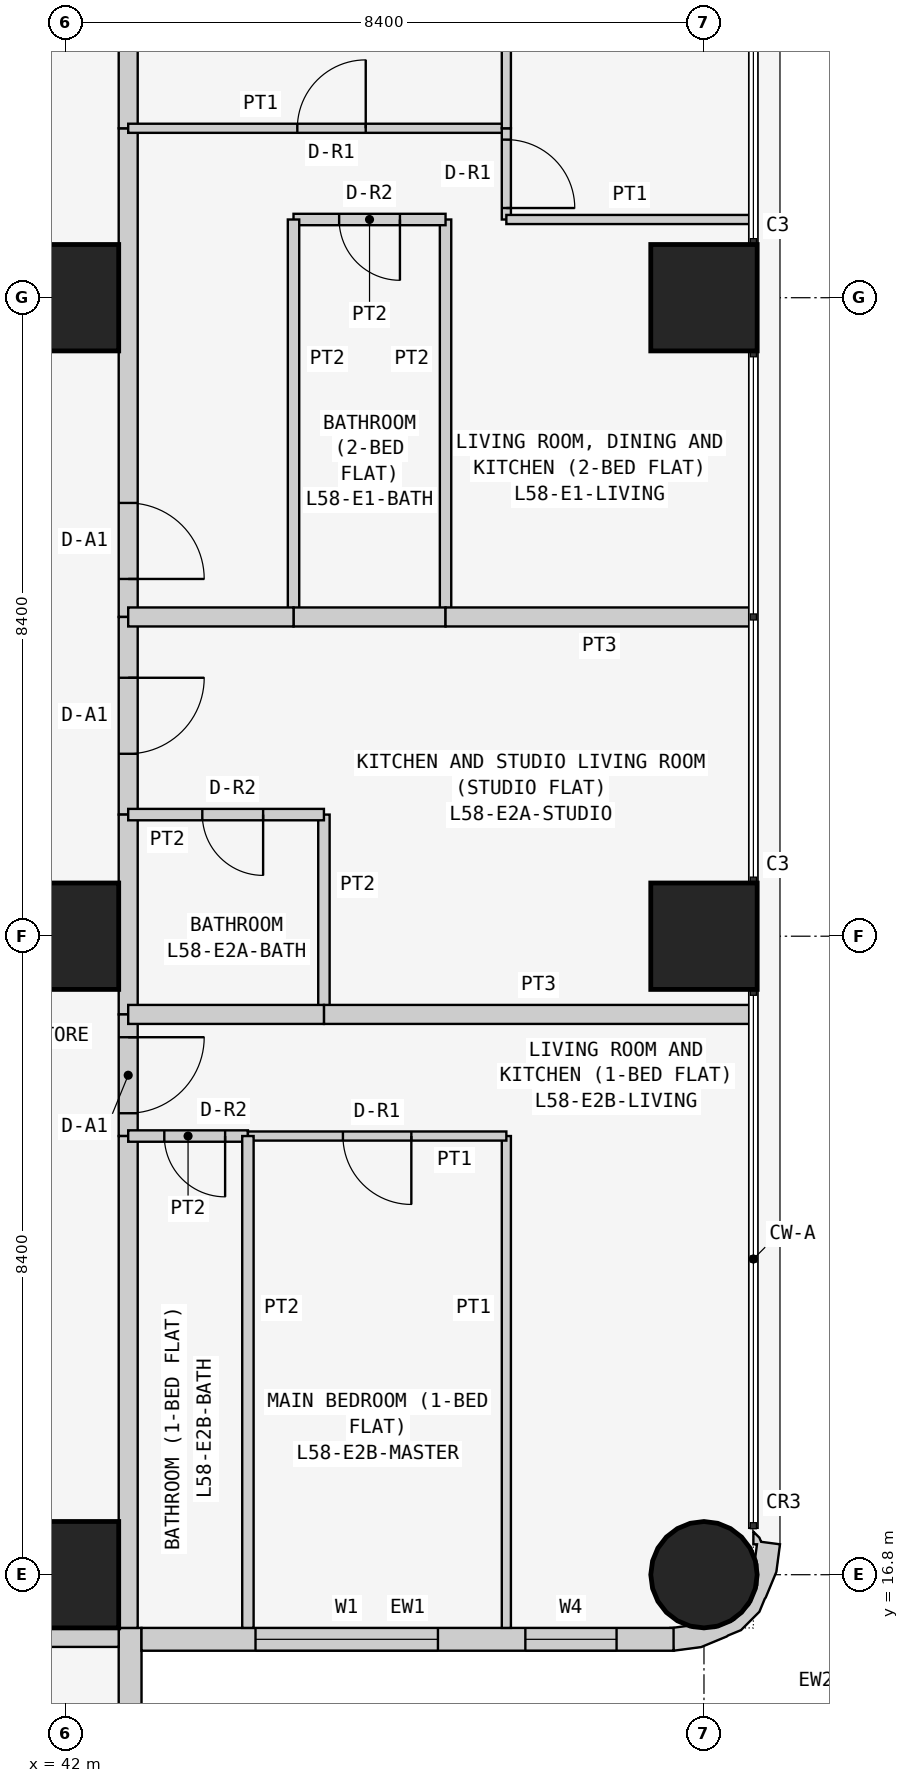
"""IFC4 building model, lengths in metres.
Left out: names, types, materials, properties, quantities, classifications, styles, units other than length and angle.
Written with IfcOpenShell. Run it as: python <this file> out.ifc"""

import sys

from ifc_helpers import new_model, si_unit, direction, frame, frame_2d, origin, origin_2d, place, context, subcontext, project, spatial, polyline, rectangle, circle, outline, extrude, element, fill, save


model = new_model("IFC4")
c1 = context("Model", 3, precision=1e-05, world=origin(), true_north=direction((0.0, 1.0)))
c2 = subcontext(c1, "Body", "Model", "MODEL_VIEW")
j1 = project(units=[si_unit("LENGTHUNIT", "METRE"), si_unit("PLANEANGLEUNIT", "RADIAN")], contexts=[c1])
p1 = place(None, origin())
s1 = spatial("IfcSite", under=j1, at=p1, CompositionType="ELEMENT")
p2 = place(p1, origin())
s2 = spatial("IfcBuilding", under=s1, at=p2, CompositionType="ELEMENT")
p3 = place(p2, frame((0.0, 0.0, 222.9)))
s3 = spatial("IfcBuildingStorey", under=s2, at=p3, CompositionType="ELEMENT", Elevation=222.9)
for number, where, z_axis, x_axis in (
    (1, (42.0, 16.8, 0.0), (0.0, 0.0, 1.0), (1.0, 0.0, 0.0)),
    (2, (42.0, 25.2, 0.0), (0.0, 0.0, 1.0), (1.0, 0.0, 0.0)),
    (3, (42.0, 33.6, 0.0), (0.0, 0.0, 1.0), (1.0, 0.0, 0.0)),
):
    element("IfcColumn", number, at=place(p3, frame(where, z_axis=z_axis, x_axis=x_axis)), inside=s3, PredefinedType="COLUMN", context=c2, shape_type="SweptSolid", body=[
        extrude(rectangle(XDim=1.4, YDim=1.4, at=origin_2d()), origin(), (0.0, 0.0, 1.0), 3.6),
    ])
p4 = place(p3, frame((50.4, 16.8, 0.0), z_axis=(0.0, 0.0, 1.0), x_axis=(1.0, 0.0, 0.0)))
e4 = element("IfcColumn", 4, at=p4, inside=s3, PredefinedType="COLUMN", context=c2, shape_type="SweptSolid", body=[
    extrude(circle(Radius=0.7, at=origin_2d()), origin(), (0.0, 0.0, 1.0), 3.6),
])
for number, where, z_axis, x_axis in (
    (5, (50.4, 25.2, 0.0), (0.0, 0.0, 1.0), (1.0, 0.0, 0.0)),
    (6, (50.4, 33.6, 0.0), (0.0, 0.0, 1.0), (1.0, 0.0, 0.0)),
):
    element("IfcColumn", number, at=place(p3, frame(where, z_axis=z_axis, x_axis=x_axis)), inside=s3, PredefinedType="COLUMN", context=c2, shape_type="SweptSolid", body=[
        extrude(rectangle(XDim=1.4, YDim=1.4, at=origin_2d()), origin(), (0.0, 0.0, 1.0), 3.6),
    ])
p5 = place(p3, frame((42.85, 8.8, 0.0), z_axis=(0.0, 0.0, 1.0), x_axis=(0.0, 1.0, 0.0)))
e7 = element("IfcWall", 7, at=p5, inside=s3, PredefinedType="SOLIDWALL", context=c2, shape_type="SweptSolid", body=[
    extrude(rectangle(XDim=7.3, YDim=0.3, at=frame_2d((3.65, 0.0))), origin(), (0.0, 0.0, 1.0), 3.45),
])
p6 = place(p5, frame((3.1, 0.0, 0.9)))
e8 = element("IfcOpeningElement", 8, at=p6, cuts=e7, PredefinedType="OPENING", context=c2, shape_type="SweptSolid", body=[
    extrude(rectangle(XDim=2.4, YDim=1.5, at=frame_2d((1.2, 0.75))), frame((0.0, 0.16, 0.0), z_axis=(0.0, -1.0, 0.0), x_axis=(1.0, 0.0, 0.0)), (0.0, 0.0, 1.0), 0.32),
])
p7 = place(p5, frame((0.75, 0.0, 0.9)))
e9 = element("IfcOpeningElement", 9, at=p7, cuts=e7, PredefinedType="OPENING", context=c2, shape_type="SweptSolid", body=[
    extrude(rectangle(XDim=1.2, YDim=1.5, at=frame_2d((0.6, 0.75))), frame((0.0, 0.16, 0.0), z_axis=(0.0, -1.0, 0.0), x_axis=(1.0, 0.0, 0.0)), (0.0, 0.0, 1.0), 0.32),
])
p8 = place(p3, frame((43.0, 15.95, 0.0), z_axis=(0.0, 0.0, 1.0), x_axis=(1.0, 0.0, 0.0)))
e10 = element("IfcWall", 10, at=p8, inside=s3, PredefinedType="SOLIDWALL", context=c2, shape_type="SweptSolid", body=[
    extrude(rectangle(XDim=7.0, YDim=0.3, at=frame_2d((3.5, 0.0))), origin(), (0.0, 0.0, 1.0), 3.45),
])
p9 = place(p8, frame((1.5, 0.0, 0.9)))
e11 = element("IfcOpeningElement", 11, at=p9, cuts=e10, PredefinedType="OPENING", context=c2, shape_type="SweptSolid", body=[
    extrude(rectangle(XDim=2.4, YDim=1.5, at=frame_2d((1.2, 0.75))), frame((0.0, 0.16, 0.0), z_axis=(0.0, -1.0, 0.0), x_axis=(1.0, 0.0, 0.0)), (0.0, 0.0, 1.0), 0.32),
])
p10 = place(p8, frame((5.05, 0.0, 0.9)))
e12 = element("IfcOpeningElement", 12, at=p10, cuts=e10, PredefinedType="OPENING", context=c2, shape_type="SweptSolid", body=[
    extrude(rectangle(XDim=1.2, YDim=1.5, at=frame_2d((0.6, 0.75))), frame((0.0, 0.16, 0.0), z_axis=(0.0, -1.0, 0.0), x_axis=(1.0, 0.0, 0.0)), (0.0, 0.0, 1.0), 0.32),
])
p11 = place(p3, frame((50.11, 16.076, 0.0), z_axis=(0.0, 0.0, 1.0), x_axis=(0.898030234854, -0.439933741929, 0.0)))
e13 = element("IfcWall", 13, at=p11, inside=s3, PredefinedType="SOLIDWALL", context=c2, shape_type="SweptSolid", body=[
    extrude(outline(polyline([(0.664, 1.577), (0.426, 1.497), (0.382, 1.536), (0.276, 1.572), (0.349, 1.423), (0.392, 1.444), (0.453, 1.261), (0.51, 1.211), (0.632, 0.961), (0.65, 0.683), (0.56, 0.419), (0.375, 0.21), (0.125, 0.087), (0.05, 0.082), (-0.128, -0.035), (-0.145, -0.044), (0.022, -0.296), (0.327, -0.094), (0.568, 0.18), (0.577, 0.199), (0.7, 0.337), (0.811, 0.661), (0.799, 0.846), (0.803, 0.866), (0.78, 1.231), (0.664, 1.577)])), origin(), (0.0, 0.0, 1.0), 3.45),
])
p12 = place(p3, frame((42.825, 35.829, 0.0), z_axis=(0.0, 0.0, 1.0), x_axis=(0.0, -1.0, 0.0)))
e14 = element("IfcWall", 14, at=p12, inside=s3, PredefinedType="PARTITIONING", context=c2, shape_type="SweptSolid", body=[
    extrude(rectangle(XDim=6.429, YDim=0.25, at=frame_2d((3.215, 0.0))), origin(), (0.0, 0.0, 1.0), 3.45),
])
p13 = place(p12, frame((4.929, 0.0, 0.0)))
e15 = element("IfcOpeningElement", 15, at=p13, cuts=e14, PredefinedType="OPENING", context=c2, shape_type="SweptSolid", body=[
    extrude(rectangle(XDim=1.0, YDim=2.1, at=frame_2d((0.5, 1.05))), frame((0.0, 0.135, 0.0), z_axis=(0.0, -1.0, 0.0), x_axis=(1.0, 0.0, 0.0)), (0.0, 0.0, 1.0), 0.27),
])
p14 = place(p3, frame((42.825, 42.7, 0.0), z_axis=(0.0, 0.0, 1.0), x_axis=(0.0, -1.0, 0.0)))
e16 = element("IfcWall", 16, at=p14, inside=s3, PredefinedType="PARTITIONING", context=c2, shape_type="SweptSolid", body=[
    extrude(rectangle(XDim=6.871, YDim=0.25, at=frame_2d((3.436, 0.0))), origin(), (0.0, 0.0, 1.0), 3.45),
])
p15 = place(p3, frame((42.825, 29.4, 0.0), z_axis=(0.0, 0.0, 1.0), x_axis=(0.0, -1.0, 0.0)))
e17 = element("IfcWall", 17, at=p15, inside=s3, PredefinedType="PARTITIONING", context=c2, shape_type="SweptSolid", body=[
    extrude(rectangle(XDim=2.6, YDim=0.25, at=frame_2d((1.3, 0.0))), origin(), (0.0, 0.0, 1.0), 3.45),
])
p16 = place(p15, frame((0.8, 0.0, 0.0)))
e18 = element("IfcOpeningElement", 18, at=p16, cuts=e17, PredefinedType="OPENING", context=c2, shape_type="SweptSolid", body=[
    extrude(rectangle(XDim=1.0, YDim=2.1, at=frame_2d((0.5, 1.05))), frame((0.0, 0.135, 0.0), z_axis=(0.0, -1.0, 0.0), x_axis=(1.0, 0.0, 0.0)), (0.0, 0.0, 1.0), 0.27),
])
p17 = place(p3, frame((42.825, 26.8, 0.0), z_axis=(0.0, 0.0, 1.0), x_axis=(0.0, -1.0, 0.0)))
e19 = element("IfcWall", 19, at=p17, inside=s3, PredefinedType="PARTITIONING", context=c2, shape_type="SweptSolid", body=[
    extrude(rectangle(XDim=2.629, YDim=0.25, at=frame_2d((1.314, 0.0))), origin(), (0.0, 0.0, 1.0), 3.45),
])
p18 = place(p3, frame((42.825, 24.171, 0.0), z_axis=(0.0, 0.0, 1.0), x_axis=(0.0, -1.0, 0.0)))
e20 = element("IfcWall", 20, at=p18, inside=s3, PredefinedType="PARTITIONING", context=c2, shape_type="SweptSolid", body=[
    extrude(rectangle(XDim=1.6, YDim=0.25, at=frame_2d((0.8, 0.0))), origin(), (0.0, 0.0, 1.0), 3.45),
])
p19 = place(p18, frame((0.3, 0.0, 0.0)))
e21 = element("IfcOpeningElement", 21, at=p19, cuts=e20, PredefinedType="OPENING", context=c2, shape_type="SweptSolid", body=[
    extrude(rectangle(XDim=1.0, YDim=2.1, at=frame_2d((0.5, 1.05))), frame((0.0, 0.135, 0.0), z_axis=(0.0, -1.0, 0.0), x_axis=(1.0, 0.0, 0.0)), (0.0, 0.0, 1.0), 0.27),
])
p20 = place(p3, frame((42.825, 22.571, 0.0), z_axis=(0.0, 0.0, 1.0), x_axis=(0.0, -1.0, 0.0)))
e22 = element("IfcWall", 22, at=p20, inside=s3, PredefinedType="PARTITIONING", context=c2, shape_type="SweptSolid", body=[
    extrude(rectangle(XDim=6.471, YDim=0.25, at=frame_2d((3.235, 0.0))), origin(), (0.0, 0.0, 1.0), 3.45),
])
p21 = place(p3, frame((42.7, 15.975, 0.0), z_axis=(0.0, 0.0, 1.0), x_axis=(-1.0, 0.0, 0.0)))
e23 = element("IfcWall", 23, at=p21, inside=s3, PredefinedType="PARTITIONING", context=c2, shape_type="SweptSolid", body=[
    extrude(rectangle(XDim=6.871, YDim=0.25, at=frame_2d((3.436, 0.0))), origin(), (0.0, 0.0, 1.0), 3.45),
])
p22 = place(p3, frame((47.0, 29.4, 0.0), z_axis=(0.0, 0.0, 1.0), x_axis=(0.0, 1.0, 0.0)))
e24 = element("IfcWall", 24, at=p22, inside=s3, PredefinedType="PARTITIONING", context=c2, shape_type="SweptSolid", body=[
    extrude(rectangle(XDim=5.229, YDim=0.15, at=frame_2d((2.615, 0.0))), origin(), (0.0, 0.0, 1.0), 3.45),
])
p23 = place(p3, frame((47.0, 34.629, 0.0), z_axis=(0.0, 0.0, 1.0), x_axis=(-1.0, 0.0, 0.0)))
e25 = element("IfcWall", 25, at=p23, inside=s3, PredefinedType="PARTITIONING", context=c2, shape_type="SweptSolid", body=[
    extrude(rectangle(XDim=2.0, YDim=0.15, at=frame_2d((1.0, 0.0))), origin(), (0.0, 0.0, 1.0), 3.45),
])
p24 = place(p23, frame((0.6, 0.0, 0.0)))
e26 = element("IfcOpeningElement", 26, at=p24, cuts=e25, PredefinedType="OPENING", context=c2, shape_type="SweptSolid", body=[
    extrude(rectangle(XDim=0.8, YDim=2.1, at=frame_2d((0.4, 1.05))), frame((0.0, 0.085, 0.0), z_axis=(0.0, -1.0, 0.0), x_axis=(1.0, 0.0, 0.0)), (0.0, 0.0, 1.0), 0.17),
])
p25 = place(p3, frame((45.0, 34.629, 0.0), z_axis=(0.0, 0.0, 1.0), x_axis=(0.0, -1.0, 0.0)))
e27 = element("IfcWall", 27, at=p25, inside=s3, PredefinedType="PARTITIONING", context=c2, shape_type="SweptSolid", body=[
    extrude(rectangle(XDim=5.229, YDim=0.15, at=frame_2d((2.615, 0.0))), origin(), (0.0, 0.0, 1.0), 3.45),
])
p26 = place(p3, frame((45.0, 29.4, 0.0), z_axis=(0.0, 0.0, 1.0), x_axis=(1.0, 0.0, 0.0)))
e28 = element("IfcWall", 28, at=p26, inside=s3, PredefinedType="PARTITIONING", context=c2, shape_type="SweptSolid", body=[
    extrude(rectangle(XDim=2.0, YDim=0.25, at=frame_2d((1.0, 0.0))), origin(), (0.0, 0.0, 1.0), 3.45),
])
p27 = place(p3, frame((42.825, 35.829, 0.0), z_axis=(0.0, 0.0, 1.0), x_axis=(1.0, 0.0, 0.0)))
e29 = element("IfcWall", 29, at=p27, inside=s3, PredefinedType="PARTITIONING", context=c2, shape_type="SweptSolid", body=[
    extrude(rectangle(XDim=4.975, YDim=0.12, at=frame_2d((2.488, 0.0))), origin(), (0.0, 0.0, 1.0), 3.45),
])
p28 = place(p27, frame((2.225, 0.0, 0.0)))
e30 = element("IfcOpeningElement", 30, at=p28, cuts=e29, PredefinedType="OPENING", context=c2, shape_type="SweptSolid", body=[
    extrude(rectangle(XDim=0.9, YDim=2.1, at=frame_2d((0.45, 1.05))), frame((0.0, 0.07, 0.0), z_axis=(0.0, -1.0, 0.0), x_axis=(1.0, 0.0, 0.0)), (0.0, 0.0, 1.0), 0.14),
])
p29 = place(p3, frame((47.8, 35.829, 0.0), z_axis=(0.0, 0.0, 1.0), x_axis=(0.0, -1.0, 0.0)))
e31 = element("IfcWall", 31, at=p29, inside=s3, PredefinedType="PARTITIONING", context=c2, shape_type="SweptSolid", body=[
    extrude(rectangle(XDim=1.2, YDim=0.12, at=frame_2d((0.6, 0.0))), origin(), (0.0, 0.0, 1.0), 3.45),
])
p30 = place(p29, frame((0.149, 0.0, 0.0)))
e32 = element("IfcOpeningElement", 32, at=p30, cuts=e31, PredefinedType="OPENING", context=c2, shape_type="SweptSolid", body=[
    extrude(rectangle(XDim=0.9, YDim=2.1, at=frame_2d((0.45, 1.05))), frame((0.0, 0.07, 0.0), z_axis=(0.0, -1.0, 0.0), x_axis=(1.0, 0.0, 0.0)), (0.0, 0.0, 1.0), 0.14),
])
p31 = place(p3, frame((47.8, 34.629, 0.0), z_axis=(0.0, 0.0, 1.0), x_axis=(1.0, 0.0, 0.0)))
e33 = element("IfcWall", 33, at=p31, inside=s3, PredefinedType="PARTITIONING", context=c2, shape_type="SweptSolid", body=[
    extrude(rectangle(XDim=3.25, YDim=0.12, at=frame_2d((1.625, 0.0))), origin(), (0.0, 0.0, 1.0), 3.45),
])
p32 = place(p3, frame((45.0, 29.4, 0.0), z_axis=(0.0, 0.0, 1.0), x_axis=(-1.0, 0.0, 0.0)))
e34 = element("IfcWall", 34, at=p32, inside=s3, PredefinedType="PARTITIONING", context=c2, shape_type="SweptSolid", body=[
    extrude(rectangle(XDim=2.175, YDim=0.25, at=frame_2d((1.087, 0.0))), origin(), (0.0, 0.0, 1.0), 3.45),
])
p33 = place(p3, frame((51.05, 29.4, 0.0), z_axis=(0.0, 0.0, 1.0), x_axis=(-1.0, 0.0, 0.0)))
e35 = element("IfcWall", 35, at=p33, inside=s3, PredefinedType="PARTITIONING", context=c2, shape_type="SweptSolid", body=[
    extrude(rectangle(XDim=4.05, YDim=0.25, at=frame_2d((2.025, 0.0))), origin(), (0.0, 0.0, 1.0), 3.45),
])
p34 = place(p3, frame((47.8, 35.829, 0.0), z_axis=(0.0, 0.0, 1.0), x_axis=(0.0, 1.0, 0.0)))
e36 = element("IfcWall", 36, at=p34, inside=s3, PredefinedType="PARTITIONING", context=c2, shape_type="SweptSolid", body=[
    extrude(rectangle(XDim=6.871, YDim=0.12, at=frame_2d((3.436, 0.0))), origin(), (0.0, 0.0, 1.0), 3.45),
])
p35 = place(p3, frame((45.4, 24.171, 0.0), z_axis=(0.0, 0.0, 1.0), x_axis=(0.0, 1.0, 0.0)))
e37 = element("IfcWall", 37, at=p35, inside=s3, PredefinedType="PARTITIONING", context=c2, shape_type="SweptSolid", body=[
    extrude(rectangle(XDim=2.629, YDim=0.15, at=frame_2d((1.314, 0.0))), origin(), (0.0, 0.0, 1.0), 3.45),
])
p36 = place(p3, frame((45.4, 26.8, 0.0), z_axis=(0.0, 0.0, 1.0), x_axis=(-1.0, 0.0, 0.0)))
e38 = element("IfcWall", 38, at=p36, inside=s3, PredefinedType="PARTITIONING", context=c2, shape_type="SweptSolid", body=[
    extrude(rectangle(XDim=2.575, YDim=0.15, at=frame_2d((1.288, 0.0))), origin(), (0.0, 0.0, 1.0), 3.45),
])
p37 = place(p36, frame((0.8, 0.0, 0.0)))
e39 = element("IfcOpeningElement", 39, at=p37, cuts=e38, PredefinedType="OPENING", context=c2, shape_type="SweptSolid", body=[
    extrude(rectangle(XDim=0.8, YDim=2.1, at=frame_2d((0.4, 1.05))), frame((0.0, 0.085, 0.0), z_axis=(0.0, -1.0, 0.0), x_axis=(1.0, 0.0, 0.0)), (0.0, 0.0, 1.0), 0.17),
])
p38 = place(p3, frame((51.05, 24.171, 0.0), z_axis=(0.0, 0.0, 1.0), x_axis=(-1.0, 0.0, 0.0)))
e40 = element("IfcWall", 40, at=p38, inside=s3, PredefinedType="PARTITIONING", context=c2, shape_type="SweptSolid", body=[
    extrude(rectangle(XDim=5.65, YDim=0.25, at=frame_2d((2.825, 0.0))), origin(), (0.0, 0.0, 1.0), 3.45),
])
p39 = place(p3, frame((45.4, 24.171, 0.0), z_axis=(0.0, 0.0, 1.0), x_axis=(-1.0, 0.0, 0.0)))
e41 = element("IfcWall", 41, at=p39, inside=s3, PredefinedType="PARTITIONING", context=c2, shape_type="SweptSolid", body=[
    extrude(rectangle(XDim=2.575, YDim=0.25, at=frame_2d((1.288, 0.0))), origin(), (0.0, 0.0, 1.0), 3.45),
])
p40 = place(p3, frame((44.4, 22.571, 0.0), z_axis=(0.0, 0.0, 1.0), x_axis=(-1.0, 0.0, 0.0)))
e42 = element("IfcWall", 42, at=p40, inside=s3, PredefinedType="PARTITIONING", context=c2, shape_type="SweptSolid", body=[
    extrude(rectangle(XDim=1.575, YDim=0.15, at=frame_2d((0.788, 0.0))), origin(), (0.0, 0.0, 1.0), 3.45),
])
p41 = place(p40, frame((0.3, 0.0, 0.0)))
e43 = element("IfcOpeningElement", 43, at=p41, cuts=e42, PredefinedType="OPENING", context=c2, shape_type="SweptSolid", body=[
    extrude(rectangle(XDim=0.8, YDim=2.1, at=frame_2d((0.4, 1.05))), frame((0.0, 0.085, 0.0), z_axis=(0.0, -1.0, 0.0), x_axis=(1.0, 0.0, 0.0)), (0.0, 0.0, 1.0), 0.17),
])
p42 = place(p3, frame((47.8, 16.1, 0.0), z_axis=(0.0, 0.0, 1.0), x_axis=(0.0, 1.0, 0.0)))
e44 = element("IfcWall", 44, at=p42, inside=s3, PredefinedType="PARTITIONING", context=c2, shape_type="SweptSolid", body=[
    extrude(rectangle(XDim=6.471, YDim=0.12, at=frame_2d((3.235, 0.0))), origin(), (0.0, 0.0, 1.0), 3.45),
])
p43 = place(p3, frame((47.8, 22.571, 0.0), z_axis=(0.0, 0.0, 1.0), x_axis=(-1.0, 0.0, 0.0)))
e45 = element("IfcWall", 45, at=p43, inside=s3, PredefinedType="PARTITIONING", context=c2, shape_type="SweptSolid", body=[
    extrude(rectangle(XDim=3.4, YDim=0.12, at=frame_2d((1.7, 0.0))), origin(), (0.0, 0.0, 1.0), 3.45),
])
p44 = place(p43, frame((1.25, 0.0, 0.0)))
e46 = element("IfcOpeningElement", 46, at=p44, cuts=e45, PredefinedType="OPENING", context=c2, shape_type="SweptSolid", body=[
    extrude(rectangle(XDim=0.9, YDim=2.1, at=frame_2d((0.45, 1.05))), frame((0.0, 0.07, 0.0), z_axis=(0.0, -1.0, 0.0), x_axis=(1.0, 0.0, 0.0)), (0.0, 0.0, 1.0), 0.14),
])
p45 = place(p3, frame((44.4, 22.571, 0.0), z_axis=(0.0, 0.0, 1.0), x_axis=(0.0, -1.0, 0.0)))
e47 = element("IfcWall", 47, at=p45, inside=s3, PredefinedType="PARTITIONING", context=c2, shape_type="SweptSolid", body=[
    extrude(rectangle(XDim=6.471, YDim=0.15, at=frame_2d((3.235, 0.0))), origin(), (0.0, 0.0, 1.0), 3.45),
])
p46 = place(p9, origin())
e48 = element("IfcWindow", 48, at=p46, inside=s3, PartitioningType="SINGLE_PANEL", PredefinedType="WINDOW", context=c2, shape_type="SweptSolid", body=[
    extrude(rectangle(XDim=2.4, YDim=1.5, at=frame_2d((1.2, 0.75))), frame((0.0, 0.03, 0.0), z_axis=(0.0, -1.0, 0.0), x_axis=(1.0, 0.0, 0.0)), (0.0, 0.0, 1.0), 0.06),
])
fill(e11, e48)
p47 = place(p10, origin())
e49 = element("IfcWindow", 49, at=p47, inside=s3, PartitioningType="SINGLE_PANEL", PredefinedType="WINDOW", context=c2, shape_type="SweptSolid", body=[
    extrude(rectangle(XDim=1.2, YDim=1.5, at=frame_2d((0.6, 0.75))), frame((0.0, 0.03, 0.0), z_axis=(0.0, -1.0, 0.0), x_axis=(1.0, 0.0, 0.0)), (0.0, 0.0, 1.0), 0.06),
])
fill(e12, e49)
p48 = place(p13, origin())
e50 = element("IfcDoor", 50, at=p48, inside=s3, OperationType="SINGLE_SWING_RIGHT", PredefinedType="DOOR", context=c2, shape_type="SweptSolid", body=[
    extrude(rectangle(XDim=1.0, YDim=2.1, at=frame_2d((0.5, 1.05))), frame((0.0, 0.025, 0.0), z_axis=(0.0, -1.0, 0.0), x_axis=(1.0, 0.0, 0.0)), (0.0, 0.0, 1.0), 0.05),
])
fill(e15, e50)
p49 = place(p24, origin())
e51 = element("IfcDoor", 51, at=p49, inside=s3, OperationType="SINGLE_SWING_LEFT", PredefinedType="DOOR", context=c2, shape_type="SweptSolid", body=[
    extrude(rectangle(XDim=0.8, YDim=2.1, at=frame_2d((0.4, 1.05))), frame((0.0, 0.025, 0.0), z_axis=(0.0, -1.0, 0.0), x_axis=(1.0, 0.0, 0.0)), (0.0, 0.0, 1.0), 0.05),
])
fill(e26, e51)
p50 = place(p28, origin())
e52 = element("IfcDoor", 52, at=p50, inside=s3, OperationType="SINGLE_SWING_RIGHT", PredefinedType="DOOR", context=c2, shape_type="SweptSolid", body=[
    extrude(rectangle(XDim=0.9, YDim=2.1, at=frame_2d((0.45, 1.05))), frame((0.0, 0.025, 0.0), z_axis=(0.0, -1.0, 0.0), x_axis=(1.0, 0.0, 0.0)), (0.0, 0.0, 1.0), 0.05),
])
fill(e30, e52)
p51 = place(p30, origin())
e53 = element("IfcDoor", 53, at=p51, inside=s3, OperationType="SINGLE_SWING_RIGHT", PredefinedType="DOOR", context=c2, shape_type="SweptSolid", body=[
    extrude(rectangle(XDim=0.9, YDim=2.1, at=frame_2d((0.45, 1.05))), frame((0.0, 0.025, 0.0), z_axis=(0.0, -1.0, 0.0), x_axis=(1.0, 0.0, 0.0)), (0.0, 0.0, 1.0), 0.05),
])
fill(e32, e53)
p52 = place(p16, origin())
e54 = element("IfcDoor", 54, at=p52, inside=s3, OperationType="SINGLE_SWING_LEFT", PredefinedType="DOOR", context=c2, shape_type="SweptSolid", body=[
    extrude(rectangle(XDim=1.0, YDim=2.1, at=frame_2d((0.5, 1.05))), frame((0.0, 0.025, 0.0), z_axis=(0.0, -1.0, 0.0), x_axis=(1.0, 0.0, 0.0)), (0.0, 0.0, 1.0), 0.05),
])
fill(e18, e54)
p53 = place(p37, origin())
e55 = element("IfcDoor", 55, at=p53, inside=s3, OperationType="SINGLE_SWING_LEFT", PredefinedType="DOOR", context=c2, shape_type="SweptSolid", body=[
    extrude(rectangle(XDim=0.8, YDim=2.1, at=frame_2d((0.4, 1.05))), frame((0.0, 0.025, 0.0), z_axis=(0.0, -1.0, 0.0), x_axis=(1.0, 0.0, 0.0)), (0.0, 0.0, 1.0), 0.05),
])
fill(e39, e55)
p54 = place(p19, origin())
e56 = element("IfcDoor", 56, at=p54, inside=s3, OperationType="SINGLE_SWING_LEFT", PredefinedType="DOOR", context=c2, shape_type="SweptSolid", body=[
    extrude(rectangle(XDim=1.0, YDim=2.1, at=frame_2d((0.5, 1.05))), frame((0.0, 0.025, 0.0), z_axis=(0.0, -1.0, 0.0), x_axis=(1.0, 0.0, 0.0)), (0.0, 0.0, 1.0), 0.05),
])
fill(e21, e56)
p55 = place(p41, origin())
e57 = element("IfcDoor", 57, at=p55, inside=s3, OperationType="SINGLE_SWING_LEFT", PredefinedType="DOOR", context=c2, shape_type="SweptSolid", body=[
    extrude(rectangle(XDim=0.8, YDim=2.1, at=frame_2d((0.4, 1.05))), frame((0.0, 0.025, 0.0), z_axis=(0.0, -1.0, 0.0), x_axis=(1.0, 0.0, 0.0)), (0.0, 0.0, 1.0), 0.05),
])
fill(e43, e57)
p56 = place(p44, origin())
e58 = element("IfcDoor", 58, at=p56, inside=s3, OperationType="SINGLE_SWING_LEFT", PredefinedType="DOOR", context=c2, shape_type="SweptSolid", body=[
    extrude(rectangle(XDim=0.9, YDim=2.1, at=frame_2d((0.45, 1.05))), frame((0.0, 0.025, 0.0), z_axis=(0.0, -1.0, 0.0), x_axis=(1.0, 0.0, 0.0)), (0.0, 0.0, 1.0), 0.05),
])
fill(e46, e58)
save(model, sys.argv[1])
